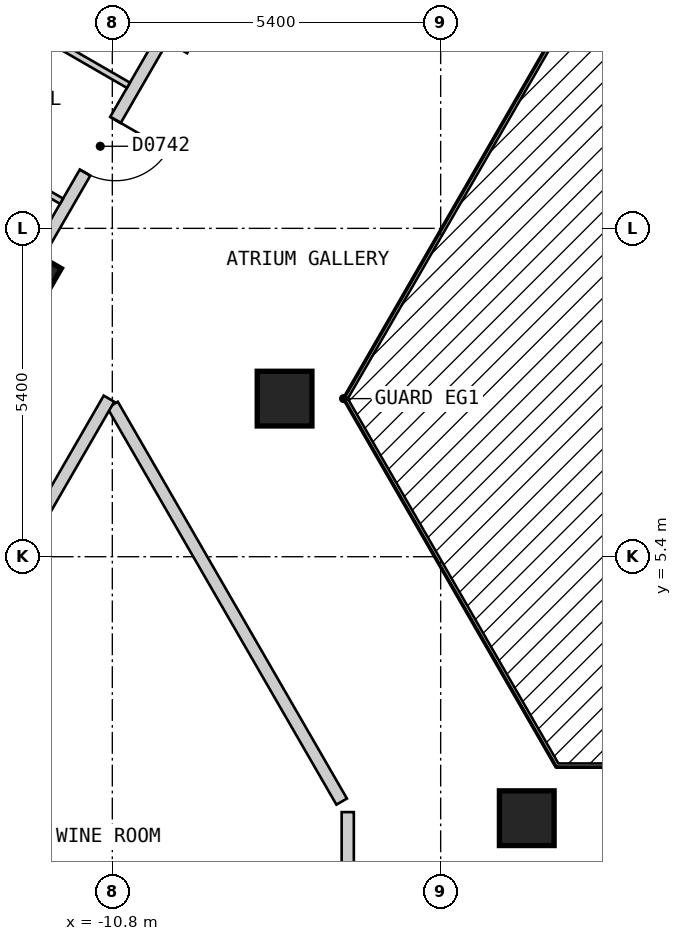
"""IFC4 building model, lengths in metres.
Left out: names, types, materials, properties, quantities, classifications, styles, units other than length and angle.
Written with IfcOpenShell. Run it as: python <this file> out.ifc"""

import sys

from ifc_helpers import new_model, si_unit, direction, frame, frame_2d, origin, origin_2d, place, context, subcontext, project, spatial, rectangle, extrude, element, fill, save


model = new_model("IFC4")
c1 = context("Model", 3, precision=1e-05, world=origin(), true_north=direction((0.0, 1.0)))
c2 = subcontext(c1, "Body", "Model", "MODEL_VIEW")
j1 = project(units=[si_unit("LENGTHUNIT", "METRE"), si_unit("PLANEANGLEUNIT", "RADIAN")], contexts=[c1])
p1 = place(None, origin())
s1 = spatial("IfcSite", under=j1, at=p1, CompositionType="ELEMENT")
p2 = place(p1, origin())
s2 = spatial("IfcBuilding", under=s1, at=p2, CompositionType="ELEMENT")
p3 = place(p2, frame((0.0, 0.0, 93.0)))
s3 = spatial("IfcBuildingStorey", under=s2, at=p3, CompositionType="ELEMENT", Elevation=93.0)
for number, where, z_axis, x_axis in (
    (1, (-7.967, 8.0, 0.0), (0.0, 0.0, 1.0), (1.0, 0.0, 0.0)),
    (2, (-12.254, 9.975, 0.0), (0.0, 0.0, 1.0), (-0.5, -0.866, 0.0)),
    (3, (-3.984, 1.1, 0.0), (0.0, 0.0, 1.0), (1.0, 0.0, 0.0)),
):
    element("IfcColumn", number, at=place(p3, frame(where, z_axis=z_axis, x_axis=x_axis)), inside=s3, PredefinedType="COLUMN", context=c2, shape_type="SweptSolid", body=[
        extrude(rectangle(XDim=0.9, YDim=0.9, at=origin_2d()), origin(), (0.0, 0.0, 1.0), 3.0),
    ])
p4 = place(p3, frame((-10.796, 7.899, 0.0), z_axis=(0.0, 0.0, 1.0), x_axis=(0.500010383074, -0.866019409031, 0.0)))
e4 = element("IfcWall", 4, at=p4, inside=s3, PredefinedType="PARTITIONING", context=c2, shape_type="SweptSolid", body=[
    extrude(rectangle(XDim=7.535, YDim=0.2, at=frame_2d((3.768, 0.0))), origin(), (0.0, 0.0, 1.0), 2.7),
])
p5 = place(p3, frame((-16.05, -1.0, 0.0), z_axis=(0.0, 0.0, 1.0), x_axis=(0.499962449088, 0.866047082728, 0.0)))
e5 = element("IfcWall", 5, at=p5, inside=s3, PredefinedType="PARTITIONING", context=c2, shape_type="SweptSolid", body=[
    extrude(rectangle(XDim=10.391, YDim=0.2, at=frame_2d((5.195, 0.0))), origin(), (0.0, 0.0, 1.0), 2.7),
])
p6 = place(p5, frame((4.745, 0.0, 0.0)))
e6 = element("IfcOpeningElement", 6, at=p6, cuts=e5, PredefinedType="OPENING", context=c2, shape_type="SweptSolid", body=[
    extrude(rectangle(XDim=0.9, YDim=2.1, at=frame_2d((0.45, 1.05))), frame((0.0, 0.11, 0.0), z_axis=(0.0, -1.0, 0.0), x_axis=(1.0, 0.0, 0.0)), (0.0, 0.0, 1.0), 0.22),
])
p7 = place(p3, frame((-18.533, -0.901, 0.0), z_axis=(0.0, 0.0, 1.0), x_axis=(0.499981198768, 0.866036258409, 0.0)))
e7 = element("IfcWall", 7, at=p7, inside=s3, PredefinedType="PARTITIONING", context=c2, shape_type="SweptSolid", body=[
    extrude(rectangle(XDim=20.093, YDim=0.2, at=frame_2d((10.046, 0.0))), origin(), (0.0, 0.0, 1.0), 2.7),
])
p8 = place(p7, frame((14.57, 0.0, 0.0)))
e8 = element("IfcOpeningElement", 8, at=p8, cuts=e7, PredefinedType="OPENING", context=c2, shape_type="SweptSolid", body=[
    extrude(rectangle(XDim=1.0, YDim=2.1, at=frame_2d((0.5, 1.05))), frame((0.0, 0.11, 0.0), z_axis=(0.0, -1.0, 0.0), x_axis=(1.0, 0.0, 0.0)), (0.0, 0.0, 1.0), 0.22),
])
p9 = place(p7, frame((4.523, 0.0, 0.0)))
e9 = element("IfcOpeningElement", 9, at=p9, cuts=e7, PredefinedType="OPENING", context=c2, shape_type="SweptSolid", body=[
    extrude(rectangle(XDim=1.0, YDim=2.1, at=frame_2d((0.5, 1.05))), frame((0.0, 0.11, 0.0), z_axis=(0.0, -1.0, 0.0), x_axis=(1.0, 0.0, 0.0)), (0.0, 0.0, 1.0), 0.22),
])
p10 = place(p3, frame((-6.928, -2.799, 0.0), z_axis=(0.0, 0.0, 1.0), x_axis=(0.0, 1.0, 0.0)))
e10 = element("IfcWall", 10, at=p10, inside=s3, PredefinedType="PARTITIONING", context=c2, shape_type="SweptSolid", body=[
    extrude(rectangle(XDim=3.999, YDim=0.2, at=frame_2d((2.0, 0.0))), origin(), (0.0, 0.0, 1.0), 2.7),
])
p11 = place(p3, frame((-15.009, 13.196, 0.0), z_axis=(0.0, 0.0, 1.0), x_axis=(0.865916335424, -0.500188864377, 0.0)))
e11 = element("IfcWall", 11, at=p11, inside=s3, PredefinedType="PARTITIONING", context=c2, shape_type="SweptSolid", body=[
    extrude(rectangle(XDim=3.896, YDim=0.1, at=frame_2d((1.948, 0.0))), origin(), (0.0, 0.0, 1.0), 2.7),
])
p12 = place(p11, frame((1.573, 0.0, 0.0)))
e12 = element("IfcOpeningElement", 12, at=p12, cuts=e11, PredefinedType="OPENING", context=c2, shape_type="SweptSolid", body=[
    extrude(rectangle(XDim=0.8, YDim=2.1, at=frame_2d((0.4, 1.05))), frame((0.0, 0.06, 0.0), z_axis=(0.0, -1.0, 0.0), x_axis=(1.0, 0.0, 0.0)), (0.0, 0.0, 1.0), 0.12),
])
p13 = place(p3, frame((-13.909, 15.101, 0.0), z_axis=(0.0, 0.0, 1.0), x_axis=(0.866024880635, -0.500000906121, 0.0)))
e13 = element("IfcWall", 13, at=p13, inside=s3, PredefinedType="PARTITIONING", context=c2, shape_type="SweptSolid", body=[
    extrude(rectangle(XDim=3.896, YDim=0.1, at=frame_2d((1.948, 0.0))), origin(), (0.0, 0.0, 1.0), 2.7),
])
p14 = place(p13, frame((1.523, 0.0, 0.0)))
e14 = element("IfcOpeningElement", 14, at=p14, cuts=e13, PredefinedType="OPENING", context=c2, shape_type="SweptSolid", body=[
    extrude(rectangle(XDim=0.9, YDim=2.1, at=frame_2d((0.45, 1.05))), frame((0.0, 0.06, 0.0), z_axis=(0.0, -1.0, 0.0), x_axis=(1.0, 0.0, 0.0)), (0.0, 0.0, 1.0), 0.12),
])
p15 = place(p8, origin())
e15 = element("IfcDoor", 15, at=p15, inside=s3, OperationType="SINGLE_SWING_RIGHT", PredefinedType="DOOR", context=c2, shape_type="SweptSolid", body=[
    extrude(rectangle(XDim=1.0, YDim=2.1, at=frame_2d((0.5, 1.05))), frame((0.0, 0.025, 0.0), z_axis=(0.0, -1.0, 0.0), x_axis=(1.0, 0.0, 0.0)), (0.0, 0.0, 1.0), 0.05),
])
fill(e8, e15)
save(model, sys.argv[1])
